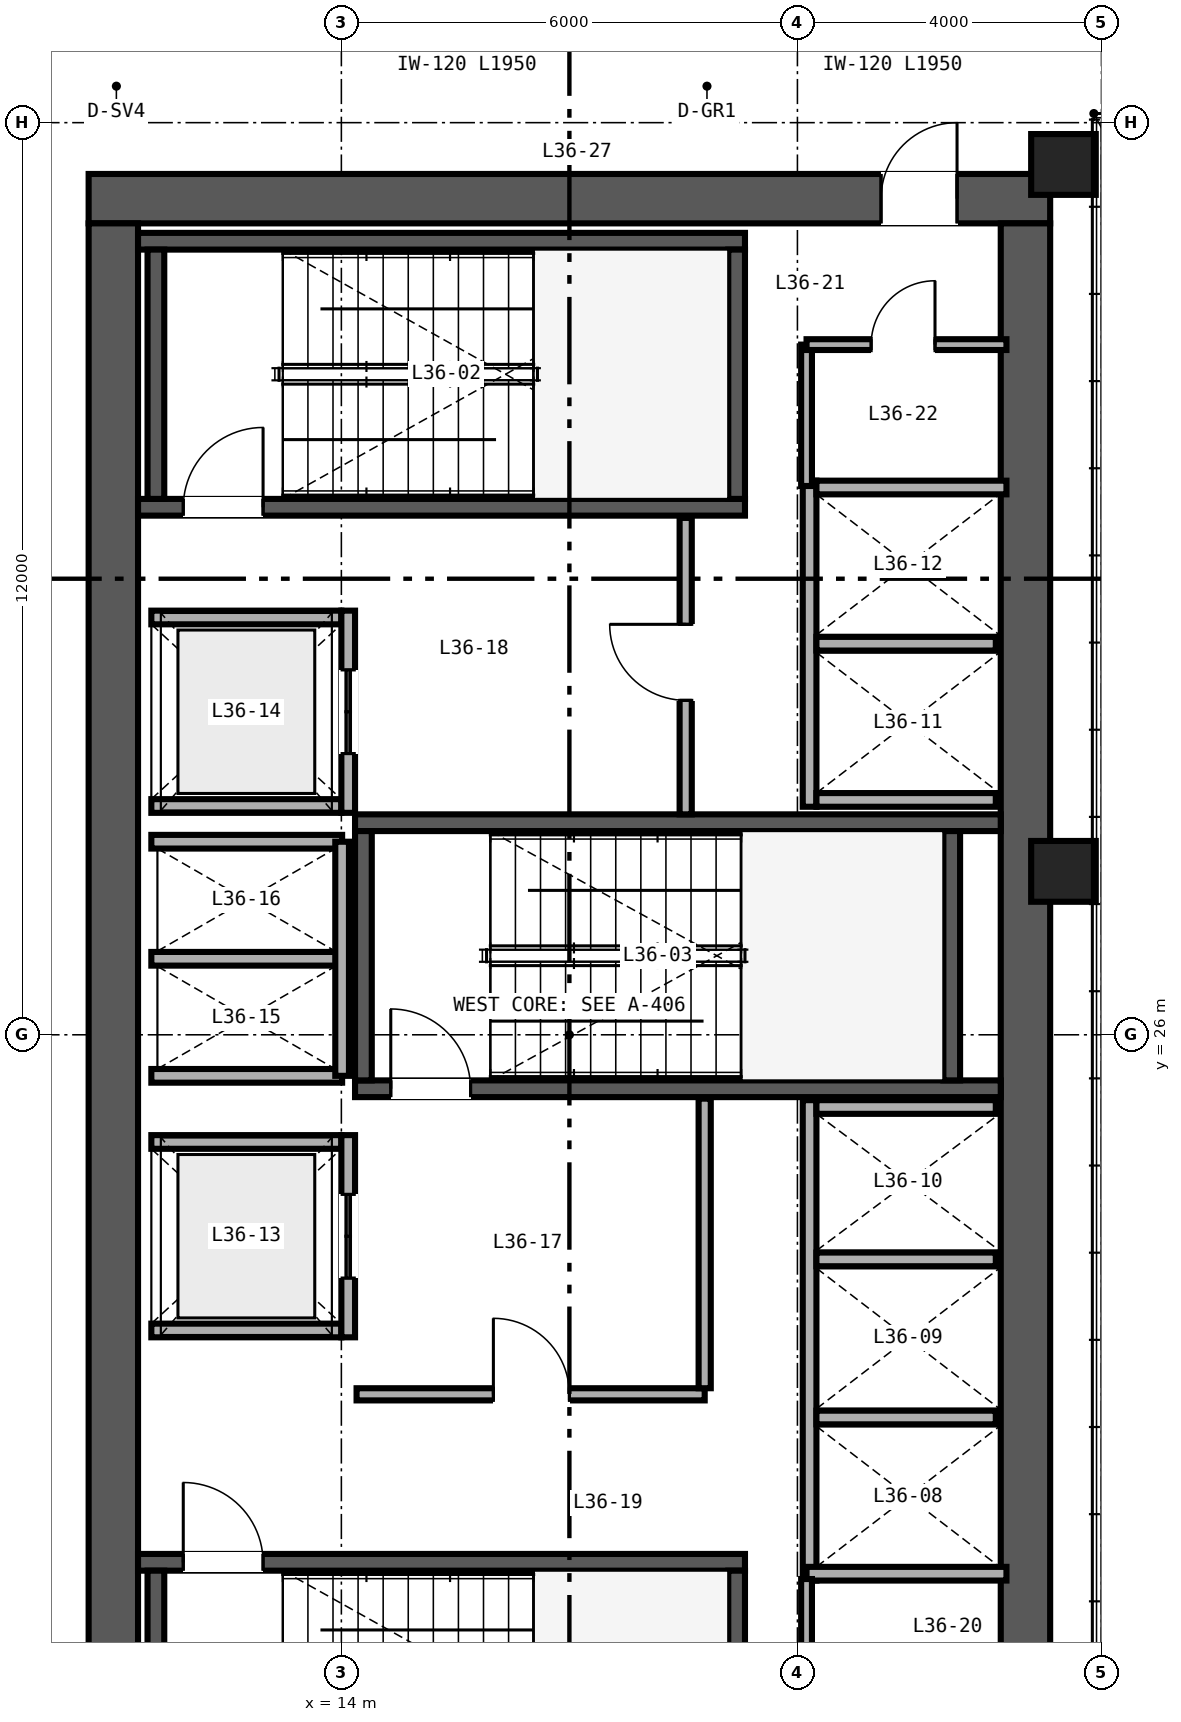
"""IFC4 building model, lengths in metres.
Left out: names, types, materials, properties, quantities, classifications, styles, units other than length and angle.
Written with IfcOpenShell. Run it as: python <this file> out.ifc"""

import sys

from ifc_helpers import new_model, si_unit, direction, frame, frame_2d, origin, origin_2d, place, context, subcontext, project, spatial, rectangle, hollow_rectangle, extrude, source, transform, mapped, element, fill, save


model = new_model("IFC4")
c1 = context("Model", 3, precision=1e-05, world=origin(), true_north=direction((0.0, 1.0)))
c2 = subcontext(c1, "Body", "Model", "MODEL_VIEW")
j1 = project(units=[si_unit("LENGTHUNIT", "METRE"), si_unit("PLANEANGLEUNIT", "RADIAN")], contexts=[c1])
p1 = place(None, origin())
s1 = spatial("IfcSite", under=j1, at=p1, CompositionType="ELEMENT")
p2 = place(p1, origin())
s2 = spatial("IfcBuilding", under=s1, at=p2, CompositionType="ELEMENT")
p3 = place(p2, frame((0.0, 0.0, 144.0)))
s3 = spatial("IfcBuildingStorey", under=s2, at=p3, CompositionType="ELEMENT", Elevation=144.0)
p4 = place(p3, frame((10.675, 37.0, 0.0), z_axis=(0.0, 0.0, 1.0), x_axis=(1.0, 0.0, 0.0)))
e1 = element("IfcWall", 1, at=p4, inside=s3, PredefinedType="SHEAR", context=c2, shape_type="SweptSolid", body=[
    extrude(rectangle(XDim=12.65, YDim=0.65, at=frame_2d((6.325, 0.0))), origin(), (0.0, 0.0, 1.0), 3.36),
])
p5 = place(p4, frame((10.425, 0.0, 0.0)))
e2 = element("IfcOpeningElement", 2, at=p5, cuts=e1, PredefinedType="OPENING", context=c2, shape_type="SweptSolid", body=[
    extrude(rectangle(XDim=1.0, YDim=2.15, at=frame_2d((0.5, 1.075))), frame((0.0, 0.335, 0.0), z_axis=(0.0, -1.0, 0.0), x_axis=(1.0, 0.0, 0.0)), (0.0, 0.0, 1.0), 0.67),
])
for number, where, z_axis, x_axis in (
    (3, (11.0, 15.325, 0.0), (0.0, 0.0, 1.0), (0.0, 1.0, 0.0)),
    (4, (23.0, 15.325, 0.0), (0.0, 0.0, 1.0), (0.0, 1.0, 0.0)),
):
    element("IfcWall", number, at=place(p3, frame(where, z_axis=z_axis, x_axis=x_axis)), inside=s3, PredefinedType="SHEAR", context=c2, shape_type="SweptSolid", body=[
        extrude(rectangle(XDim=21.35, YDim=0.65, at=frame_2d((10.675, 0.0))), origin(), (0.0, 0.0, 1.0), 3.36),
    ])
p6 = place(p3, frame((11.325, 19.06, 0.0), z_axis=(0.0, 0.0, 1.0), x_axis=(1.0, 0.0, 0.0)))
e5 = element("IfcWall", 5, at=p6, inside=s3, PredefinedType="SHEAR", context=c2, shape_type="SweptSolid", body=[
    extrude(rectangle(XDim=7.985, YDim=0.22, at=frame_2d((3.993, 0.0))), origin(), (0.0, 0.0, 1.0), 3.4),
])
p7 = place(p6, frame((0.595, 0.0, 0.0)))
e6 = element("IfcOpeningElement", 6, at=p7, cuts=e5, PredefinedType="OPENING", context=c2, shape_type="SweptSolid", body=[
    extrude(rectangle(XDim=1.05, YDim=2.15, at=frame_2d((0.525, 1.075))), frame((0.0, 0.12, 0.0), z_axis=(0.0, -1.0, 0.0), x_axis=(1.0, 0.0, 0.0)), (0.0, 0.0, 1.0), 0.24),
])
for number, where, z_axis, x_axis in (
    (7, (11.56, 15.67, 0.0), (0.0, 0.0, 1.0), (0.0, 1.0, 0.0)),
    (8, (19.2, 15.67, 0.0), (0.0, 0.0, 1.0), (0.0, 1.0, 0.0)),
):
    element("IfcWall", number, at=place(p3, frame(where, z_axis=z_axis, x_axis=x_axis)), inside=s3, PredefinedType="SHEAR", context=c2, shape_type="SweptSolid", body=[
        extrude(rectangle(XDim=3.28, YDim=0.22, at=frame_2d((1.64, 0.0))), origin(), (0.0, 0.0, 1.0), 3.4),
    ])
p8 = place(p3, frame((11.325, 32.94, 0.0), z_axis=(0.0, 0.0, 1.0), x_axis=(1.0, 0.0, 0.0)))
e9 = element("IfcWall", 9, at=p8, inside=s3, PredefinedType="SHEAR", context=c2, shape_type="SweptSolid", body=[
    extrude(rectangle(XDim=7.985, YDim=0.22, at=frame_2d((3.993, 0.0))), origin(), (0.0, 0.0, 1.0), 3.4),
])
p9 = place(p8, frame((0.595, 0.0, 0.0)))
e10 = element("IfcOpeningElement", 10, at=p9, cuts=e9, PredefinedType="OPENING", context=c2, shape_type="SweptSolid", body=[
    extrude(rectangle(XDim=1.05, YDim=2.15, at=frame_2d((0.525, 1.075))), frame((0.0, 0.12, 0.0), z_axis=(0.0, -1.0, 0.0), x_axis=(1.0, 0.0, 0.0)), (0.0, 0.0, 1.0), 0.24),
])
p10 = place(p3, frame((11.325, 36.44, 0.0), z_axis=(0.0, 0.0, 1.0), x_axis=(1.0, 0.0, 0.0)))
e11 = element("IfcWall", 11, at=p10, inside=s3, PredefinedType="SHEAR", context=c2, shape_type="SweptSolid", body=[
    extrude(rectangle(XDim=7.985, YDim=0.22, at=frame_2d((3.993, 0.0))), origin(), (0.0, 0.0, 1.0), 3.4),
])
for number, where, z_axis, x_axis in (
    (12, (11.56, 33.05, 0.0), (0.0, 0.0, 1.0), (0.0, 1.0, 0.0)),
    (13, (19.2, 33.05, 0.0), (0.0, 0.0, 1.0), (0.0, 1.0, 0.0)),
):
    element("IfcWall", number, at=place(p3, frame(where, z_axis=z_axis, x_axis=x_axis)), inside=s3, PredefinedType="SHEAR", context=c2, shape_type="SweptSolid", body=[
        extrude(rectangle(XDim=3.28, YDim=0.22, at=frame_2d((1.64, 0.0))), origin(), (0.0, 0.0, 1.0), 3.4),
    ])
p11 = place(p3, frame((14.18, 25.29, 0.0), z_axis=(0.0, 0.0, 1.0), x_axis=(1.0, 0.0, 0.0)))
e14 = element("IfcWall", 14, at=p11, inside=s3, PredefinedType="SHEAR", context=c2, shape_type="SweptSolid", body=[
    extrude(rectangle(XDim=8.495, YDim=0.22, at=frame_2d((4.248, 0.0))), origin(), (0.0, 0.0, 1.0), 3.4),
])
p12 = place(p11, frame((0.47, 0.0, 0.0)))
e15 = element("IfcOpeningElement", 15, at=p12, cuts=e14, PredefinedType="OPENING", context=c2, shape_type="SweptSolid", body=[
    extrude(rectangle(XDim=1.05, YDim=2.15, at=frame_2d((0.525, 1.075))), frame((0.0, 0.12, 0.0), z_axis=(0.0, -1.0, 0.0), x_axis=(1.0, 0.0, 0.0)), (0.0, 0.0, 1.0), 0.24),
])
p13 = place(p3, frame((14.18, 28.79, 0.0), z_axis=(0.0, 0.0, 1.0), x_axis=(1.0, 0.0, 0.0)))
e16 = element("IfcWall", 16, at=p13, inside=s3, PredefinedType="SHEAR", context=c2, shape_type="SweptSolid", body=[
    extrude(rectangle(XDim=8.495, YDim=0.22, at=frame_2d((4.248, 0.0))), origin(), (0.0, 0.0, 1.0), 3.4),
])
for number, where, z_axis, x_axis in (
    (17, (14.29, 25.4, 0.0), (0.0, 0.0, 1.0), (0.0, 1.0, 0.0)),
    (18, (22.03, 25.4, 0.0), (0.0, 0.0, 1.0), (0.0, 1.0, 0.0)),
):
    element("IfcWall", number, at=place(p3, frame(where, z_axis=z_axis, x_axis=x_axis)), inside=s3, PredefinedType="SHEAR", context=c2, shape_type="SweptSolid", body=[
        extrude(rectangle(XDim=3.28, YDim=0.22, at=frame_2d((1.64, 0.0))), origin(), (0.0, 0.0, 1.0), 3.4),
    ])
m1 = source(origin(), c2, "Body", "SweptSolid", [
    extrude(hollow_rectangle(XDim=0.85, YDim=0.8, WallThickness=0.032, at=origin_2d()), origin(), (0.0, 0.0, 1.0), 3.36),
])
for number, where, z_axis, x_axis in (
    (19, (23.5, 28.15, 0.0), (0.0, 0.0, 1.0), (1.0, 0.0, 0.0)),
    (20, (23.5, 37.45, 0.0), (0.0, 0.0, 1.0), (1.0, 0.0, 0.0)),
):
    element("IfcColumn", number, at=place(p3, frame(where, z_axis=z_axis, x_axis=x_axis)), inside=s3, PredefinedType="COLUMN", context=c2, shape_type="MappedRepresentation", body=[
        mapped(m1, transform((0.0, 0.0, 0.0), scale=1.0)),
    ])
p14 = place(p3, frame((20.16, 18.82, 0.0), z_axis=(0.0, 0.0, 1.0), x_axis=(0.0, 1.0, 0.0)))
e21 = element("IfcWall", 21, at=p14, inside=s3, PredefinedType="SOLIDWALL", context=c2, shape_type="SweptSolid", body=[
    extrude(rectangle(XDim=6.32, YDim=0.18, at=frame_2d((3.16, 0.0))), origin(), (0.0, 0.0, 1.0), 2.36),
])
p15 = place(p3, frame((20.12, 18.91, 0.0), z_axis=(0.0, 0.0, 1.0), x_axis=(1.0, 0.0, 0.0)))
e22 = element("IfcWall", 22, at=p15, inside=s3, PredefinedType="SOLIDWALL", context=c2, shape_type="SweptSolid", body=[
    extrude(rectangle(XDim=2.63, YDim=0.18, at=frame_2d((1.315, 0.0))), origin(), (0.0, 0.0, 1.0), 3.36),
])
p16 = place(p3, frame((20.25, 25.05, 0.0), z_axis=(0.0, 0.0, 1.0), x_axis=(1.0, 0.0, 0.0)))
e23 = element("IfcWall", 23, at=p16, inside=s3, PredefinedType="SOLIDWALL", context=c2, shape_type="SweptSolid", body=[
    extrude(rectangle(XDim=2.36, YDim=0.18, at=frame_2d((1.18, 0.0))), origin(), (0.0, 0.0, 1.0), 3.36),
])
p17 = place(p3, frame((20.25, 20.965, 0.0), z_axis=(0.0, 0.0, 1.0), x_axis=(1.0, 0.0, 0.0)))
e24 = element("IfcWall", 24, at=p17, inside=s3, PredefinedType="SOLIDWALL", context=c2, shape_type="SweptSolid", body=[
    extrude(rectangle(XDim=2.36, YDim=0.18, at=frame_2d((1.18, 0.0))), origin(), (0.0, 0.0, 1.0), 2.36),
])
p18 = place(p3, frame((20.25, 23.045, 0.0), z_axis=(0.0, 0.0, 1.0), x_axis=(1.0, 0.0, 0.0)))
e25 = element("IfcWall", 25, at=p18, inside=s3, PredefinedType="SOLIDWALL", context=c2, shape_type="SweptSolid", body=[
    extrude(rectangle(XDim=2.36, YDim=0.18, at=frame_2d((1.18, 0.0))), origin(), (0.0, 0.0, 1.0), 3.36),
])
p19 = place(p3, frame((20.16, 29.0, 0.0), z_axis=(0.0, 0.0, 1.0), x_axis=(0.0, 1.0, 0.0)))
e26 = element("IfcWall", 26, at=p19, inside=s3, PredefinedType="SOLIDWALL", context=c2, shape_type="SweptSolid", body=[
    extrude(rectangle(XDim=4.29, YDim=0.18, at=frame_2d((2.145, 0.0))), origin(), (0.0, 0.0, 1.0), 3.36),
])
p20 = place(p3, frame((20.25, 29.09, 0.0), z_axis=(0.0, 0.0, 1.0), x_axis=(1.0, 0.0, 0.0)))
e27 = element("IfcWall", 27, at=p20, inside=s3, PredefinedType="SOLIDWALL", context=c2, shape_type="SweptSolid", body=[
    extrude(rectangle(XDim=2.36, YDim=0.18, at=frame_2d((1.18, 0.0))), origin(), (0.0, 0.0, 1.0), 3.36),
])
p21 = place(p3, frame((20.25, 33.2, 0.0), z_axis=(0.0, 0.0, 1.0), x_axis=(1.0, 0.0, 0.0)))
e28 = element("IfcWall", 28, at=p21, inside=s3, PredefinedType="SOLIDWALL", context=c2, shape_type="SweptSolid", body=[
    extrude(rectangle(XDim=2.5, YDim=0.18, at=frame_2d((1.25, 0.0))), origin(), (0.0, 0.0, 1.0), 3.36),
])
p22 = place(p3, frame((20.25, 31.145, 0.0), z_axis=(0.0, 0.0, 1.0), x_axis=(1.0, 0.0, 0.0)))
e29 = element("IfcWall", 29, at=p22, inside=s3, PredefinedType="SOLIDWALL", context=c2, shape_type="SweptSolid", body=[
    extrude(rectangle(XDim=2.36, YDim=0.18, at=frame_2d((1.18, 0.0))), origin(), (0.0, 0.0, 1.0), 3.36),
])
for number, where, z_axis, x_axis in (
    (30, (11.5, 22.11, 0.0), (0.0, 0.0, 1.0), (1.0, 0.0, 0.0)),
    (31, (11.5, 24.59, 0.0), (0.0, 0.0, 1.0), (1.0, 0.0, 0.0)),
):
    element("IfcWall", number, at=place(p3, frame(where, z_axis=z_axis, x_axis=x_axis)), inside=s3, PredefinedType="SOLIDWALL", context=c2, shape_type="SweptSolid", body=[
        extrude(rectangle(XDim=2.5, YDim=0.18, at=frame_2d((1.25, 0.0))), origin(), (0.0, 0.0, 1.0), 3.36),
    ])
p23 = place(p3, frame((14.09, 22.02, 0.0), z_axis=(0.0, 0.0, 1.0), x_axis=(0.0, 1.0, 0.0)))
e32 = element("IfcWall", 32, at=p23, inside=s3, PredefinedType="SOLIDWALL", context=c2, shape_type="SweptSolid", body=[
    extrude(rectangle(XDim=2.66, YDim=0.18, at=frame_2d((1.33, 0.0))), origin(), (0.0, 0.0, 1.0), 3.36),
])
p24 = place(p23, frame((0.78, 0.0, 0.0)))
e33 = element("IfcOpeningElement", 33, at=p24, cuts=e32, PredefinedType="OPENING", context=c2, shape_type="SweptSolid", body=[
    extrude(rectangle(XDim=1.1, YDim=2.2, at=frame_2d((0.55, 1.1))), frame((0.0, 0.1, 0.0), z_axis=(0.0, -1.0, 0.0), x_axis=(1.0, 0.0, 0.0)), (0.0, 0.0, 1.0), 0.2),
])
for number, where, z_axis, x_axis in (
    (34, (11.5, 29.01, 0.0), (0.0, 0.0, 1.0), (1.0, 0.0, 0.0)),
    (35, (11.5, 31.49, 0.0), (0.0, 0.0, 1.0), (1.0, 0.0, 0.0)),
):
    element("IfcWall", number, at=place(p3, frame(where, z_axis=z_axis, x_axis=x_axis)), inside=s3, PredefinedType="SOLIDWALL", context=c2, shape_type="SweptSolid", body=[
        extrude(rectangle(XDim=2.5, YDim=0.18, at=frame_2d((1.25, 0.0))), origin(), (0.0, 0.0, 1.0), 3.36),
    ])
p25 = place(p3, frame((14.09, 28.92, 0.0), z_axis=(0.0, 0.0, 1.0), x_axis=(0.0, 1.0, 0.0)))
e36 = element("IfcWall", 36, at=p25, inside=s3, PredefinedType="SOLIDWALL", context=c2, shape_type="SweptSolid", body=[
    extrude(rectangle(XDim=2.66, YDim=0.18, at=frame_2d((1.33, 0.0))), origin(), (0.0, 0.0, 1.0), 3.36),
])
p26 = place(p25, frame((0.78, 0.0, 0.0)))
e37 = element("IfcOpeningElement", 37, at=p26, cuts=e36, PredefinedType="OPENING", context=c2, shape_type="SweptSolid", body=[
    extrude(rectangle(XDim=1.1, YDim=2.2, at=frame_2d((0.55, 1.1))), frame((0.0, 0.1, 0.0), z_axis=(0.0, -1.0, 0.0), x_axis=(1.0, 0.0, 0.0)), (0.0, 0.0, 1.0), 0.2),
])
for number, where, z_axis, x_axis in (
    (38, (11.5, 25.46, 0.0), (0.0, 0.0, 1.0), (1.0, 0.0, 0.0)),
    (39, (11.5, 27.0, 0.0), (0.0, 0.0, 1.0), (1.0, 0.0, 0.0)),
    (40, (11.5, 28.54, 0.0), (0.0, 0.0, 1.0), (1.0, 0.0, 0.0)),
):
    element("IfcWall", number, at=place(p3, frame(where, z_axis=z_axis, x_axis=x_axis)), inside=s3, PredefinedType="SOLIDWALL", context=c2, shape_type="SweptSolid", body=[
        extrude(rectangle(XDim=2.51, YDim=0.18, at=frame_2d((1.255, 0.0))), origin(), (0.0, 0.0, 1.0), 3.36),
    ])
p27 = place(p3, frame((14.01, 25.46, 0.0), z_axis=(0.0, 0.0, 1.0), x_axis=(0.0, 1.0, 0.0)))
e41 = element("IfcWall", 41, at=p27, inside=s3, PredefinedType="SOLIDWALL", context=c2, shape_type="SweptSolid", body=[
    extrude(rectangle(XDim=3.08, YDim=0.18, at=frame_2d((1.54, 0.0))), origin(), (0.0, 0.0, 1.0), 3.36),
])
p28 = place(p3, frame((14.2, 21.27, 0.0), z_axis=(0.0, 0.0, 1.0), x_axis=(1.0, 0.0, 0.0)))
e42 = element("IfcWall", 42, at=p28, inside=s3, PredefinedType="PARTITIONING", context=c2, shape_type="SweptSolid", body=[
    extrude(rectangle(XDim=4.58, YDim=0.16, at=frame_2d((2.29, 0.0))), origin(), (0.0, 0.0, 1.0), 3.36),
])
p29 = place(p28, frame((1.8, 0.0, 0.0)))
e43 = element("IfcOpeningElement", 43, at=p29, cuts=e42, PredefinedType="OPENING", context=c2, shape_type="SweptSolid", body=[
    extrude(rectangle(XDim=1.0, YDim=2.15, at=frame_2d((0.5, 1.075))), frame((0.0, 0.09, 0.0), z_axis=(0.0, -1.0, 0.0), x_axis=(1.0, 0.0, 0.0)), (0.0, 0.0, 1.0), 0.18),
])
p30 = place(p3, frame((18.78, 21.35, 0.0), z_axis=(0.0, 0.0, 1.0), x_axis=(0.0, 1.0, 0.0)))
e44 = element("IfcWall", 44, at=p30, inside=s3, PredefinedType="PARTITIONING", context=c2, shape_type="SweptSolid", body=[
    extrude(rectangle(XDim=3.81, YDim=0.16, at=frame_2d((1.905, 0.0))), origin(), (0.0, 0.0, 1.0), 3.36),
])
p31 = place(p3, frame((18.53, 28.9, 0.0), z_axis=(0.0, 0.0, 1.0), x_axis=(0.0, 1.0, 0.0)))
e45 = element("IfcWall", 45, at=p31, inside=s3, PredefinedType="PARTITIONING", context=c2, shape_type="SweptSolid", body=[
    extrude(rectangle(XDim=3.9, YDim=0.16, at=frame_2d((1.95, 0.0))), origin(), (0.0, 0.0, 1.0), 3.36),
])
p32 = place(p31, frame((1.5, 0.0, 0.0)))
e46 = element("IfcOpeningElement", 46, at=p32, cuts=e45, PredefinedType="OPENING", context=c2, shape_type="SweptSolid", body=[
    extrude(rectangle(XDim=1.0, YDim=2.15, at=frame_2d((0.5, 1.075))), frame((0.0, 0.09, 0.0), z_axis=(0.0, -1.0, 0.0), x_axis=(1.0, 0.0, 0.0)), (0.0, 0.0, 1.0), 0.18),
])
p33 = place(p3, frame((20.12, 17.08, 0.0), z_axis=(0.0, 0.0, 1.0), x_axis=(0.0, 1.0, 0.0)))
e47 = element("IfcWall", 47, at=p33, inside=s3, PredefinedType="PARTITIONING", context=c2, shape_type="SweptSolid", body=[
    extrude(rectangle(XDim=1.76, YDim=0.142, at=frame_2d((0.88, 0.0))), origin(), (0.0, 0.0, 1.0), 3.36),
])
p34 = place(p3, frame((20.12, 33.22, 0.0), z_axis=(0.0, 0.0, 1.0), x_axis=(0.0, 1.0, 0.0)))
e48 = element("IfcWall", 48, at=p34, inside=s3, PredefinedType="PARTITIONING", context=c2, shape_type="SweptSolid", body=[
    extrude(rectangle(XDim=1.86, YDim=0.142, at=frame_2d((0.93, 0.0))), origin(), (0.0, 0.0, 1.0), 3.36),
])
p35 = place(p3, frame((20.12, 35.08, 0.0), z_axis=(0.0, 0.0, 1.0), x_axis=(1.0, 0.0, 0.0)))
e49 = element("IfcWall", 49, at=p35, inside=s3, PredefinedType="PARTITIONING", context=c2, shape_type="SweptSolid", body=[
    extrude(rectangle(XDim=2.63, YDim=0.142, at=frame_2d((1.315, 0.0))), origin(), (0.0, 0.0, 1.0), 3.36),
])
p36 = place(p35, frame((0.85, 0.0, 0.0)))
e50 = element("IfcOpeningElement", 50, at=p36, cuts=e49, PredefinedType="OPENING", context=c2, shape_type="SweptSolid", body=[
    extrude(rectangle(XDim=0.84, YDim=2.1, at=frame_2d((0.42, 1.05))), frame((0.0, 0.081, 0.0), z_axis=(0.0, -1.0, 0.0), x_axis=(1.0, 0.0, 0.0)), (0.0, 0.0, 1.0), 0.162),
])
m2 = source(origin(), c2, "Body", "SweptSolid", [
    extrude(rectangle(XDim=1.05, YDim=2.15, at=frame_2d((0.525, 1.075))), frame((0.0, 0.025, 0.0), z_axis=(0.0, -1.0, 0.0), x_axis=(1.0, 0.0, 0.0)), (0.0, 0.0, 1.0), 0.05),
])
p37 = place(p7, origin())
e51 = element("IfcDoor", 51, at=p37, inside=s3, OperationType="SINGLE_SWING_LEFT", PredefinedType="DOOR", context=c2, shape_type="MappedRepresentation", body=[
    mapped(m2, transform((0.0, 0.0, 0.0), scale=1.0)),
])
fill(e6, e51)
p38 = place(p9, origin())
e52 = element("IfcDoor", 52, at=p38, inside=s3, OperationType="SINGLE_SWING_RIGHT", PredefinedType="DOOR", context=c2, shape_type="MappedRepresentation", body=[
    mapped(m2, transform((0.0, 0.0, 0.0), scale=1.0)),
])
fill(e10, e52)
p39 = place(p12, origin())
e53 = element("IfcDoor", 53, at=p39, inside=s3, OperationType="SINGLE_SWING_LEFT", PredefinedType="DOOR", context=c2, shape_type="MappedRepresentation", body=[
    mapped(m2, transform((0.0, 0.0, 0.0), scale=1.0)),
])
fill(e15, e53)
m3 = source(origin(), c2, "Body", "SweptSolid", [
    extrude(rectangle(XDim=1.1, YDim=2.2, at=frame_2d((0.55, 1.1))), frame((0.0, 0.025, 0.0), z_axis=(0.0, -1.0, 0.0), x_axis=(1.0, 0.0, 0.0)), (0.0, 0.0, 1.0), 0.05),
])
p40 = place(p24, origin())
e54 = element("IfcDoor", 54, at=p40, inside=s3, OperationType="DOUBLE_DOOR_SLIDING", PredefinedType="DOOR", context=c2, shape_type="MappedRepresentation", body=[
    mapped(m3, transform((0.0, 0.0, 0.0), scale=1.0)),
])
fill(e33, e54)
p41 = place(p26, origin())
e55 = element("IfcDoor", 55, at=p41, inside=s3, OperationType="DOUBLE_DOOR_SLIDING", PredefinedType="DOOR", context=c2, shape_type="MappedRepresentation", body=[
    mapped(m3, transform((0.0, 0.0, 0.0), scale=1.0)),
])
fill(e37, e55)
m4 = source(origin(), c2, "Body", "SweptSolid", [
    extrude(rectangle(XDim=1.0, YDim=2.15, at=frame_2d((0.5, 1.075))), frame((0.0, 0.025, 0.0), z_axis=(0.0, -1.0, 0.0), x_axis=(1.0, 0.0, 0.0)), (0.0, 0.0, 1.0), 0.05),
])
p42 = place(p29, origin())
e56 = element("IfcDoor", 56, at=p42, inside=s3, OperationType="SINGLE_SWING_LEFT", PredefinedType="DOOR", context=c2, shape_type="MappedRepresentation", body=[
    mapped(m4, transform((0.0, 0.0, 0.0), scale=1.0)),
])
fill(e43, e56)
p43 = place(p32, origin())
e57 = element("IfcDoor", 57, at=p43, inside=s3, OperationType="SINGLE_SWING_RIGHT", PredefinedType="DOOR", context=c2, shape_type="MappedRepresentation", body=[
    mapped(m4, transform((0.0, 0.0, 0.0), scale=1.0)),
])
fill(e46, e57)
m5 = source(origin(), c2, "Body", "SweptSolid", [
    extrude(rectangle(XDim=0.84, YDim=2.1, at=frame_2d((0.42, 1.05))), frame((0.0, 0.025, 0.0), z_axis=(0.0, -1.0, 0.0), x_axis=(1.0, 0.0, 0.0)), (0.0, 0.0, 1.0), 0.05),
])
p44 = place(p36, origin())
e58 = element("IfcDoor", 58, at=p44, inside=s3, OperationType="SINGLE_SWING_RIGHT", PredefinedType="DOOR", context=c2, shape_type="MappedRepresentation", body=[
    mapped(m5, transform((0.0, 0.0, 0.0), scale=1.0)),
])
fill(e50, e58)
p45 = place(p5, origin())
e59 = element("IfcDoor", 59, at=p45, inside=s3, OperationType="SINGLE_SWING_RIGHT", PredefinedType="DOOR", context=c2, shape_type="MappedRepresentation", body=[
    mapped(m4, transform((0.0, 0.0, 0.0), scale=1.0)),
])
fill(e2, e59)
save(model, sys.argv[1])
